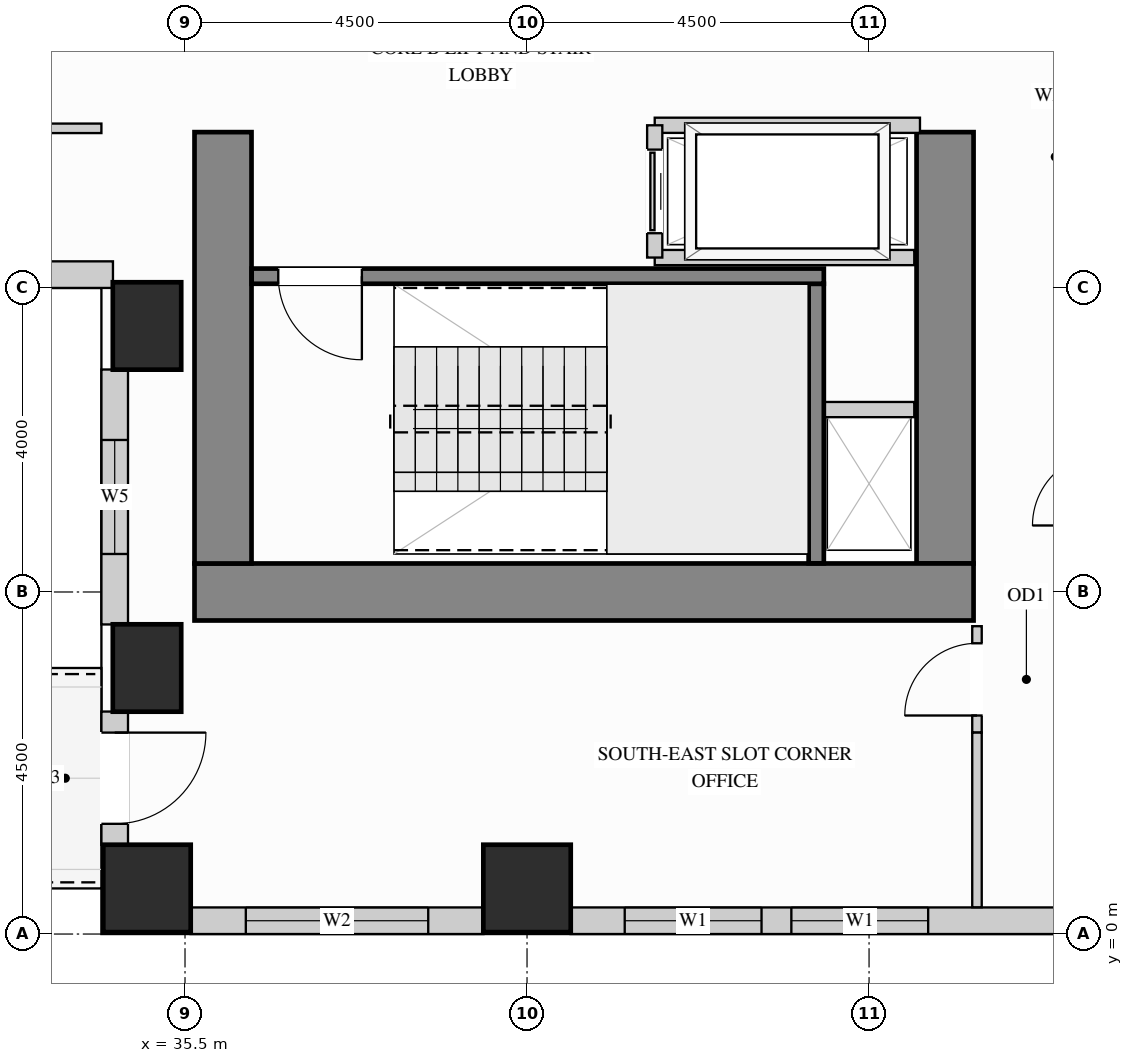
"""IFC4 building model, lengths in metres.
Left out: names, types, materials, properties, quantities, classifications, styles, units other than length and angle.
Written with IfcOpenShell. Run it as: python <this file> out.ifc"""

import sys

from ifc_helpers import new_model, si_unit, direction, frame, frame_2d, origin, origin_2d, place, context, subcontext, project, spatial, rectangle, extrude, source, transform, mapped, element, fill, save


model = new_model("IFC4")
c1 = context("Model", 3, precision=1e-05, world=origin(), true_north=direction((0.0, 1.0)))
c2 = subcontext(c1, "Body", "Model", "MODEL_VIEW")
j1 = project(units=[si_unit("LENGTHUNIT", "METRE"), si_unit("PLANEANGLEUNIT", "RADIAN")], contexts=[c1])
p1 = place(None, origin())
s1 = spatial("IfcSite", under=j1, at=p1, CompositionType="ELEMENT")
p2 = place(p1, origin())
s2 = spatial("IfcBuilding", under=s1, at=p2, CompositionType="ELEMENT")
p3 = place(p2, frame((0.0, 0.0, 106.2)))
s3 = spatial("IfcBuildingStorey", under=s2, at=p3, CompositionType="ELEMENT", Elevation=106.2)
m1 = source(origin(), c2, "Body", "SweptSolid", [
    extrude(rectangle(XDim=0.9, YDim=1.15, at=origin_2d()), origin(), (0.0, 0.0, 1.0), 3.38),
])
for number, where, z_axis, x_axis in (
    (1, (35.0, 3.5, 0.0), (0.0, 0.0, 1.0), (1.0, 0.0, 0.0)),
    (2, (35.0, 8.0, 0.0), (0.0, 0.0, 1.0), (1.0, 0.0, 0.0)),
):
    element("IfcColumn", number, at=place(p3, frame(where, z_axis=z_axis, x_axis=x_axis)), inside=s3, PredefinedType="COLUMN", context=c2, shape_type="MappedRepresentation", body=[
        mapped(m1, transform((0.0, 0.0, 0.0), x_axis=(1.0, 0.0, 0.0), y_axis=(0.0, 1.0, 0.0), z_axis=(0.0, 0.0, 1.0))),
    ])
m2 = source(origin(), c2, "Body", "SweptSolid", [
    extrude(rectangle(XDim=1.15, YDim=1.15, at=origin_2d()), origin(), (0.0, 0.0, 1.0), 3.38),
])
for number, where, z_axis, x_axis in (
    (3, (35.0, 0.6, 0.0), (0.0, 0.0, 1.0), (1.0, 0.0, 0.0)),
    (4, (40.0, 0.6, 0.0), (0.0, 0.0, 1.0), (1.0, 0.0, 0.0)),
):
    element("IfcColumn", number, at=place(p3, frame(where, z_axis=z_axis, x_axis=x_axis)), inside=s3, PredefinedType="COLUMN", context=c2, shape_type="MappedRepresentation", body=[
        mapped(m2, transform((0.0, 0.0, 0.0), x_axis=(1.0, 0.0, 0.0), y_axis=(0.0, 1.0, 0.0), z_axis=(0.0, 0.0, 1.0))),
    ])
m3 = source(origin(), c2, "Body", "SweptSolid", [
    extrude(rectangle(XDim=5.675, YDim=0.75, at=frame_2d((2.837, 0.0))), origin(), (0.0, 0.0, 1.0), 3.38),
])
p4 = place(p3, frame((45.5, 4.875, 0.0), z_axis=(0.0, 0.0, 1.0), x_axis=(0.0, 1.0, 0.0)))
e5 = element("IfcWall", 5, at=p4, inside=s3, PredefinedType="SHEAR", context=c2, shape_type="MappedRepresentation", body=[
    mapped(m3, transform((0.0, 0.0, 0.0), x_axis=(1.0, 0.0, 0.0), y_axis=(0.0, 1.0, 0.0), z_axis=(0.0, 0.0, 1.0))),
])
m4 = source(origin(), c2, "Body", "SweptSolid", [
    extrude(rectangle(XDim=10.25, YDim=0.75, at=frame_2d((5.125, 0.0))), origin(), (0.0, 0.0, 1.0), 3.38),
])
p5 = place(p3, frame((35.625, 4.5, 0.0), z_axis=(0.0, 0.0, 1.0), x_axis=(1.0, 0.0, 0.0)))
e6 = element("IfcWall", 6, at=p5, inside=s3, PredefinedType="SHEAR", context=c2, shape_type="MappedRepresentation", body=[
    mapped(m4, transform((0.0, 0.0, 0.0), x_axis=(1.0, 0.0, 0.0), y_axis=(0.0, 1.0, 0.0), z_axis=(0.0, 0.0, 1.0))),
])
p6 = place(p3, frame((36.0, 4.875, 0.0), z_axis=(0.0, 0.0, 1.0), x_axis=(0.0, 1.0, 0.0)))
e7 = element("IfcWall", 7, at=p6, inside=s3, PredefinedType="SHEAR", context=c2, shape_type="MappedRepresentation", body=[
    mapped(m3, transform((0.0, 0.0, 0.0), x_axis=(1.0, 0.0, 0.0), y_axis=(0.0, 1.0, 0.0), z_axis=(0.0, 0.0, 1.0))),
])
p7 = place(p3, frame((30.948, 8.675, 0.0), z_axis=(0.0, 0.0, 1.0), x_axis=(1.0, 0.0, 0.0)))
e8 = element("IfcWall", 8, at=p7, inside=s3, PredefinedType="SOLIDWALL", context=c2, shape_type="SweptSolid", body=[
    extrude(rectangle(XDim=3.604, YDim=0.35, at=frame_2d((1.802, 0.0))), origin(), (0.0, 0.0, 1.0), 3.365),
])
p8 = place(p7, frame((1.052, 0.0, 0.78)))
e9 = element("IfcOpeningElement", 9, at=p8, cuts=e8, PredefinedType="OPENING", context=c2, shape_type="SweptSolid", body=[
    extrude(rectangle(XDim=1.5, YDim=2.0, at=frame_2d((0.75, 1.0))), frame((0.0, 0.185, 0.0), z_axis=(0.0, -1.0, 0.0), x_axis=(1.0, 0.0, 0.0)), (0.0, 0.0, 1.0), 0.37),
])
p9 = place(p3, frame((34.575, 7.427, 0.0), z_axis=(0.0, 0.0, 1.0), x_axis=(0.0, -1.0, 0.0)))
e10 = element("IfcWall", 10, at=p9, inside=s3, PredefinedType="SOLIDWALL", context=c2, shape_type="SweptSolid", body=[
    extrude(rectangle(XDim=3.354, YDim=0.35, at=frame_2d((1.677, 0.0))), origin(), (0.0, 0.0, 1.0), 3.365),
])
p10 = place(p9, frame((0.927, 0.0, 0.78)))
e11 = element("IfcOpeningElement", 11, at=p10, cuts=e10, PredefinedType="OPENING", context=c2, shape_type="SweptSolid", body=[
    extrude(rectangle(XDim=1.5, YDim=2.0, at=frame_2d((0.75, 1.0))), frame((0.0, 0.185, 0.0), z_axis=(0.0, -1.0, 0.0), x_axis=(1.0, 0.0, 0.0)), (0.0, 0.0, 1.0), 0.37),
])
p11 = place(p3, frame((34.575, 2.927, 0.0), z_axis=(0.0, 0.0, 1.0), x_axis=(0.0, -1.0, 0.0)))
e12 = element("IfcWall", 12, at=p11, inside=s3, PredefinedType="SOLIDWALL", context=c2, shape_type="SweptSolid", body=[
    extrude(rectangle(XDim=1.754, YDim=0.35, at=frame_2d((0.877, 0.0))), origin(), (0.0, 0.0, 1.0), 3.365),
])
p12 = place(p11, frame((0.277, 0.0, 0.0)))
e13 = element("IfcOpeningElement", 13, at=p12, cuts=e12, PredefinedType="OPENING", context=c2, shape_type="SweptSolid", body=[
    extrude(rectangle(XDim=1.2, YDim=2.15, at=frame_2d((0.6, 1.075))), frame((0.0, 0.185, 0.0), z_axis=(0.0, -1.0, 0.0), x_axis=(1.0, 0.0, 0.0)), (0.0, 0.0, 1.0), 0.37),
])
p13 = place(p3, frame((35.573, 0.175, 0.0), z_axis=(0.0, 0.0, 1.0), x_axis=(1.0, 0.0, 0.0)))
e14 = element("IfcWall", 14, at=p13, inside=s3, PredefinedType="SOLIDWALL", context=c2, shape_type="SweptSolid", body=[
    extrude(rectangle(XDim=3.854, YDim=0.35, at=frame_2d((1.927, 0.0))), origin(), (0.0, 0.0, 1.0), 3.365),
])
p14 = place(p13, frame((0.727, 0.0, 0.78)))
e15 = element("IfcOpeningElement", 15, at=p14, cuts=e14, PredefinedType="OPENING", context=c2, shape_type="SweptSolid", body=[
    extrude(rectangle(XDim=2.4, YDim=2.1, at=frame_2d((1.2, 1.05))), frame((0.0, 0.185, 0.0), z_axis=(0.0, -1.0, 0.0), x_axis=(1.0, 0.0, 0.0)), (0.0, 0.0, 1.0), 0.37),
])
p15 = place(p3, frame((40.573, 0.175, 0.0), z_axis=(0.0, 0.0, 1.0), x_axis=(1.0, 0.0, 0.0)))
e16 = element("IfcWall", 16, at=p15, inside=s3, PredefinedType="SOLIDWALL", context=c2, shape_type="SweptSolid", body=[
    extrude(rectangle(XDim=6.454, YDim=0.35, at=frame_2d((3.227, 0.0))), origin(), (0.0, 0.0, 1.0), 3.365),
])
p16 = place(p15, frame((0.712, 0.0, 0.78)))
e17 = element("IfcOpeningElement", 17, at=p16, cuts=e16, PredefinedType="OPENING", context=c2, shape_type="SweptSolid", body=[
    extrude(rectangle(XDim=1.8, YDim=2.1, at=frame_2d((0.9, 1.05))), frame((0.0, 0.185, 0.0), z_axis=(0.0, -1.0, 0.0), x_axis=(1.0, 0.0, 0.0)), (0.0, 0.0, 1.0), 0.37),
])
p17 = place(p15, frame((2.905, 0.0, 0.78)))
e18 = element("IfcOpeningElement", 18, at=p17, cuts=e16, PredefinedType="OPENING", context=c2, shape_type="SweptSolid", body=[
    extrude(rectangle(XDim=1.8, YDim=2.1, at=frame_2d((0.9, 1.05))), frame((0.0, 0.185, 0.0), z_axis=(0.0, -1.0, 0.0), x_axis=(1.0, 0.0, 0.0)), (0.0, 0.0, 1.0), 0.37),
])
p18 = place(p3, frame((45.92, 2.65, 0.0), z_axis=(0.0, 0.0, 1.0), x_axis=(0.0, 1.0, 0.0)))
e19 = element("IfcWall", 19, at=p18, inside=s3, PredefinedType="PARTITIONING", context=c2, shape_type="SweptSolid", body=[
    extrude(rectangle(XDim=1.4, YDim=0.125, at=frame_2d((0.7, 0.0))), origin(), (0.0, 0.0, 1.0), 3.365),
])
p19 = place(p18, frame((0.225, 0.0, 0.0)))
e20 = element("IfcOpeningElement", 20, at=p19, cuts=e19, PredefinedType="OPENING", context=c2, shape_type="SweptSolid", body=[
    extrude(rectangle(XDim=0.95, YDim=2.15, at=frame_2d((0.475, 1.075))), frame((0.0, 0.073, 0.0), z_axis=(0.0, -1.0, 0.0), x_axis=(1.0, 0.0, 0.0)), (0.0, 0.0, 1.0), 0.145),
])
m5 = source(origin(), c2, "Body", "SweptSolid", [
    extrude(rectangle(XDim=2.298, YDim=0.125, at=frame_2d((1.149, 0.0))), origin(), (0.0, 0.0, 1.0), 3.365),
])
p20 = place(p3, frame((45.92, 0.352, 0.0), z_axis=(0.0, 0.0, 1.0), x_axis=(0.0, 1.0, 0.0)))
e21 = element("IfcWall", 21, at=p20, inside=s3, PredefinedType="PARTITIONING", context=c2, shape_type="MappedRepresentation", body=[
    mapped(m5, transform((0.0, 0.0, 0.0), x_axis=(1.0, 0.0, 0.0), y_axis=(0.0, 1.0, 0.0), z_axis=(0.0, 0.0, 1.0))),
])
p21 = place(p3, frame((19.5, 10.6, 0.0), z_axis=(0.0, 0.0, 1.0), x_axis=(1.0, 0.0, 0.0)))
e22 = element("IfcWall", 22, at=p21, inside=s3, PredefinedType="PARTITIONING", context=c2, shape_type="SweptSolid", body=[
    extrude(rectangle(XDim=14.9, YDim=0.125, at=frame_2d((7.45, 0.0))), origin(), (0.0, 0.0, 1.0), 3.365),
])
p22 = place(p21, frame((6.975, 0.0, 0.0)))
e23 = element("IfcOpeningElement", 23, at=p22, cuts=e22, PredefinedType="OPENING", context=c2, shape_type="SweptSolid", body=[
    extrude(rectangle(XDim=0.95, YDim=2.15, at=frame_2d((0.475, 1.075))), frame((0.0, 0.073, 0.0), z_axis=(0.0, -1.0, 0.0), x_axis=(1.0, 0.0, 0.0)), (0.0, 0.0, 1.0), 0.145),
])
m6 = source(origin(), c2, "Body", "SweptSolid", [
    extrude(rectangle(XDim=1.245, YDim=0.2, at=frame_2d((0.623, 0.0))), origin(), (0.0, 0.0, 1.0), 3.365),
])
p23 = place(p3, frame((43.85, 6.9, 0.0), z_axis=(0.0, 0.0, 1.0), x_axis=(1.0, 0.0, 0.0)))
e24 = element("IfcWall", 24, at=p23, inside=s3, PredefinedType="PARTITIONING", context=c2, shape_type="MappedRepresentation", body=[
    mapped(m6, transform((0.0, 0.0, 0.0), x_axis=(1.0, 0.0, 0.0), y_axis=(0.0, 1.0, 0.0), z_axis=(0.0, 0.0, 1.0))),
])
m7 = source(origin(), c2, "Body", "SweptSolid", [
    extrude(rectangle(XDim=3.49, YDim=0.2, at=frame_2d((1.745, 0.0))), origin(), (0.0, 0.0, 1.0), 3.365),
])
p24 = place(p3, frame((41.68, 10.64, 0.0), z_axis=(0.0, 0.0, 1.0), x_axis=(1.0, 0.0, 0.0)))
e25 = element("IfcWall", 25, at=p24, inside=s3, PredefinedType="PARTITIONING", context=c2, shape_type="MappedRepresentation", body=[
    mapped(m7, transform((0.0, 0.0, 0.0), x_axis=(1.0, 0.0, 0.0), y_axis=(0.0, 1.0, 0.0), z_axis=(0.0, 0.0, 1.0))),
])
m8 = source(origin(), c2, "Body", "SweptSolid", [
    extrude(rectangle(XDim=3.415, YDim=0.2, at=frame_2d((1.708, 0.0))), origin(), (0.0, 0.0, 1.0), 3.365),
])
p25 = place(p3, frame((41.68, 8.9, 0.0), z_axis=(0.0, 0.0, 1.0), x_axis=(1.0, 0.0, 0.0)))
e26 = element("IfcWall", 26, at=p25, inside=s3, PredefinedType="PARTITIONING", context=c2, shape_type="MappedRepresentation", body=[
    mapped(m8, transform((0.0, 0.0, 0.0), x_axis=(1.0, 0.0, 0.0), y_axis=(0.0, 1.0, 0.0), z_axis=(0.0, 0.0, 1.0))),
])
p26 = place(p3, frame((41.68, 8.9, 0.0), z_axis=(0.0, 0.0, 1.0), x_axis=(0.0, 1.0, 0.0)))
e27 = element("IfcWall", 27, at=p26, inside=s3, PredefinedType="PARTITIONING", context=c2, shape_type="SweptSolid", body=[
    extrude(rectangle(XDim=1.74, YDim=0.2, at=frame_2d((0.87, 0.0))), origin(), (0.0, 0.0, 1.0), 3.365),
])
p27 = place(p26, frame((0.32, 0.0, 0.0)))
e28 = element("IfcOpeningElement", 28, at=p27, cuts=e27, PredefinedType="OPENING", context=c2, shape_type="SweptSolid", body=[
    extrude(rectangle(XDim=1.1, YDim=2.2, at=frame_2d((0.55, 1.1))), frame((0.0, 0.11, 0.0), z_axis=(0.0, -1.0, 0.0), x_axis=(1.0, 0.0, 0.0)), (0.0, 0.0, 1.0), 0.22),
])
m9 = source(origin(), c2, "Body", "SweptSolid", [
    extrude(rectangle(XDim=3.678, YDim=0.2, at=frame_2d((1.839, 0.0))), origin(), (0.0, 0.0, 1.0), 3.38),
])
p28 = place(p3, frame((43.805, 4.877, 0.0), z_axis=(0.0, 0.0, 1.0), x_axis=(0.0, 1.0, 0.0)))
e29 = element("IfcWall", 29, at=p28, inside=s3, PredefinedType="SHEAR", context=c2, shape_type="MappedRepresentation", body=[
    mapped(m9, transform((0.0, 0.0, 0.0), x_axis=(1.0, 0.0, 0.0), y_axis=(0.0, 1.0, 0.0), z_axis=(0.0, 0.0, 1.0))),
])
p29 = place(p3, frame((36.377, 8.655, 0.0), z_axis=(0.0, 0.0, 1.0), x_axis=(1.0, 0.0, 0.0)))
e30 = element("IfcWall", 30, at=p29, inside=s3, PredefinedType="SHEAR", context=c2, shape_type="SweptSolid", body=[
    extrude(rectangle(XDim=7.528, YDim=0.2, at=frame_2d((3.764, 0.0))), origin(), (0.0, 0.0, 1.0), 3.38),
])
p30 = place(p29, frame((0.35, 0.0, 0.0)))
e31 = element("IfcOpeningElement", 31, at=p30, cuts=e30, PredefinedType="OPENING", context=c2, shape_type="SweptSolid", body=[
    extrude(rectangle(XDim=1.1, YDim=2.15, at=frame_2d((0.55, 1.075))), frame((0.0, 0.11, 0.0), z_axis=(0.0, -1.0, 0.0), x_axis=(1.0, 0.0, 0.0)), (0.0, 0.0, 1.0), 0.22),
])
m10 = source(origin(), c2, "Body", "SweptSolid", [
    extrude(rectangle(XDim=1.2, YDim=2.15, at=frame_2d((0.6, 1.075))), frame((0.0, 0.025, 0.0), z_axis=(0.0, -1.0, 0.0), x_axis=(1.0, 0.0, 0.0)), (0.0, 0.0, 1.0), 0.05),
])
p31 = place(p12, frame((1.2, 0.0, 0.0), z_axis=(0.0, 0.0, 1.0), x_axis=(-1.0, 0.0, 0.0)))
e32 = element("IfcDoor", 32, at=p31, inside=s3, OperationType="SINGLE_SWING_LEFT", PredefinedType="DOOR", context=c2, shape_type="MappedRepresentation", body=[
    mapped(m10, transform((0.0, 0.0, 0.0), x_axis=(1.0, 0.0, 0.0), y_axis=(0.0, 1.0, 0.0), z_axis=(0.0, 0.0, 1.0))),
])
fill(e13, e32)
m11 = source(origin(), c2, "Body", "SweptSolid", [
    extrude(rectangle(XDim=1.1, YDim=2.2, at=frame_2d((0.55, 1.1))), frame((0.0, 0.025, 0.0), z_axis=(0.0, -1.0, 0.0), x_axis=(1.0, 0.0, 0.0)), (0.0, 0.0, 1.0), 0.05),
])
p32 = place(p27, origin())
e33 = element("IfcDoor", 33, at=p32, inside=s3, OperationType="SLIDING_TO_LEFT", PredefinedType="DOOR", context=c2, shape_type="MappedRepresentation", body=[
    mapped(m11, transform((0.0, 0.0, 0.0), x_axis=(1.0, 0.0, 0.0), y_axis=(0.0, 1.0, 0.0), z_axis=(0.0, 0.0, 1.0))),
])
fill(e28, e33)
m12 = source(origin(), c2, "Body", "SweptSolid", [
    extrude(rectangle(XDim=0.95, YDim=2.15, at=frame_2d((0.475, 1.075))), frame((0.0, 0.025, 0.0), z_axis=(0.0, -1.0, 0.0), x_axis=(1.0, 0.0, 0.0)), (0.0, 0.0, 1.0), 0.05),
])
p33 = place(p19, origin())
e34 = element("IfcDoor", 34, at=p33, inside=s3, OperationType="SINGLE_SWING_LEFT", PredefinedType="DOOR", context=c2, shape_type="MappedRepresentation", body=[
    mapped(m12, transform((0.0, 0.0, 0.0), x_axis=(1.0, 0.0, 0.0), y_axis=(0.0, 1.0, 0.0), z_axis=(0.0, 0.0, 1.0))),
])
fill(e20, e34)
m13 = source(origin(), c2, "Body", "SweptSolid", [
    extrude(rectangle(XDim=1.1, YDim=2.15, at=frame_2d((0.55, 1.075))), frame((0.0, 0.025, 0.0), z_axis=(0.0, -1.0, 0.0), x_axis=(1.0, 0.0, 0.0)), (0.0, 0.0, 1.0), 0.05),
])
p34 = place(p30, origin())
e35 = element("IfcDoor", 35, at=p34, inside=s3, OperationType="SINGLE_SWING_RIGHT", PredefinedType="DOOR", context=c2, shape_type="MappedRepresentation", body=[
    mapped(m13, transform((0.0, 0.0, 0.0), x_axis=(1.0, 0.0, 0.0), y_axis=(0.0, 1.0, 0.0), z_axis=(0.0, 0.0, 1.0))),
])
fill(e31, e35)
m14 = source(origin(), c2, "Body", "SweptSolid", [
    extrude(rectangle(XDim=1.8, YDim=2.1, at=frame_2d((0.9, 1.05))), frame((0.0, 0.03, 0.0), z_axis=(0.0, -1.0, 0.0), x_axis=(1.0, 0.0, 0.0)), (0.0, 0.0, 1.0), 0.06),
])
p35 = place(p16, origin())
e36 = element("IfcWindow", 36, at=p35, inside=s3, PartitioningType="SINGLE_PANEL", PredefinedType="WINDOW", context=c2, shape_type="MappedRepresentation", body=[
    mapped(m14, transform((0.0, 0.0, 0.0), x_axis=(1.0, 0.0, 0.0), y_axis=(0.0, 1.0, 0.0), z_axis=(0.0, 0.0, 1.0))),
])
fill(e17, e36)
p36 = place(p17, origin())
e37 = element("IfcWindow", 37, at=p36, inside=s3, PartitioningType="SINGLE_PANEL", PredefinedType="WINDOW", context=c2, shape_type="MappedRepresentation", body=[
    mapped(m14, transform((0.0, 0.0, 0.0), x_axis=(1.0, 0.0, 0.0), y_axis=(0.0, 1.0, 0.0), z_axis=(0.0, 0.0, 1.0))),
])
fill(e18, e37)
m15 = source(origin(), c2, "Body", "SweptSolid", [
    extrude(rectangle(XDim=2.4, YDim=2.1, at=frame_2d((1.2, 1.05))), frame((0.0, 0.03, 0.0), z_axis=(0.0, -1.0, 0.0), x_axis=(1.0, 0.0, 0.0)), (0.0, 0.0, 1.0), 0.06),
])
p37 = place(p14, origin())
e38 = element("IfcWindow", 38, at=p37, inside=s3, PartitioningType="SINGLE_PANEL", PredefinedType="WINDOW", context=c2, shape_type="MappedRepresentation", body=[
    mapped(m15, transform((0.0, 0.0, 0.0), x_axis=(1.0, 0.0, 0.0), y_axis=(0.0, 1.0, 0.0), z_axis=(0.0, 0.0, 1.0))),
])
fill(e15, e38)
m16 = source(origin(), c2, "Body", "SweptSolid", [
    extrude(rectangle(XDim=1.5, YDim=2.0, at=frame_2d((0.75, 1.0))), frame((0.0, 0.03, 0.0), z_axis=(0.0, -1.0, 0.0), x_axis=(1.0, 0.0, 0.0)), (0.0, 0.0, 1.0), 0.06),
])
p38 = place(p10, origin())
e39 = element("IfcWindow", 39, at=p38, inside=s3, PartitioningType="SINGLE_PANEL", PredefinedType="WINDOW", context=c2, shape_type="MappedRepresentation", body=[
    mapped(m16, transform((0.0, 0.0, 0.0), x_axis=(1.0, 0.0, 0.0), y_axis=(0.0, 1.0, 0.0), z_axis=(0.0, 0.0, 1.0))),
])
fill(e11, e39)
save(model, sys.argv[1])
